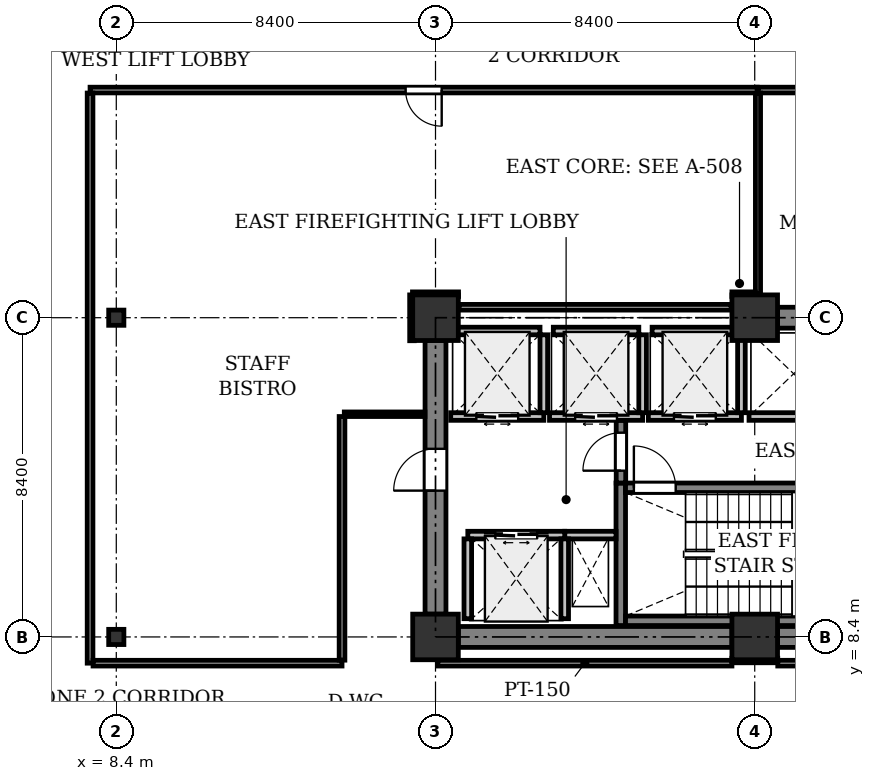
"""IFC4 building model, lengths in metres.
Left out: names, types, materials, properties, quantities, classifications, styles, units other than length and angle.
Written with IfcOpenShell. Run it as: python <this file> out.ifc"""

import sys

from ifc_helpers import new_model, si_unit, direction, frame, frame_2d, origin, origin_2d, place, context, subcontext, project, spatial, rectangle, i_section, extrude, element, fill, save


model = new_model("IFC4")
c1 = context("Model", 3, precision=1e-05, world=origin(), true_north=direction((0.0, 1.0)))
c2 = subcontext(c1, "Body", "Model", "MODEL_VIEW")
j1 = project(units=[si_unit("LENGTHUNIT", "METRE"), si_unit("PLANEANGLEUNIT", "RADIAN")], contexts=[c1])
p1 = place(None, origin())
s1 = spatial("IfcSite", under=j1, at=p1, CompositionType="ELEMENT")
p2 = place(p1, origin())
s2 = spatial("IfcBuilding", under=s1, at=p2, CompositionType="ELEMENT")
p3 = place(p2, frame((0.0, 0.0, 117.2)))
s3 = spatial("IfcBuildingStorey", under=s2, at=p3, CompositionType="ELEMENT", Elevation=117.2)
for number, where, z_axis, x_axis in (
    (1, (8.4, 8.4, 0.0), (0.0, 0.0, 1.0), (1.0, 0.0, 0.0)),
    (2, (8.4, 16.8, 0.0), (0.0, 0.0, 1.0), (1.0, 0.0, 0.0)),
):
    element("IfcColumn", number, at=place(p3, frame(where, z_axis=z_axis, x_axis=x_axis)), inside=s3, PredefinedType="COLUMN", context=c2, shape_type="SweptSolid", body=[
        extrude(i_section(OverallWidth=0.4, OverallDepth=0.4, WebThickness=0.025, FlangeThickness=0.04, at=origin_2d()), origin(), (0.0, 0.0, 1.0), 4.1),
    ])
for number, where, z_axis, x_axis in (
    (3, (16.8, 8.4, 0.0), (0.0, 0.0, 1.0), (1.0, 0.0, 0.0)),
    (4, (16.8, 16.8, 0.0), (0.0, 0.0, 1.0), (1.0, 0.0, 0.0)),
    (5, (25.2, 8.4, 0.0), (0.0, 0.0, 1.0), (1.0, 0.0, 0.0)),
    (6, (25.2, 16.8, 0.0), (0.0, 0.0, 1.0), (1.0, 0.0, 0.0)),
):
    element("IfcColumn", number, at=place(p3, frame(where, z_axis=z_axis, x_axis=x_axis)), inside=s3, PredefinedType="COLUMN", context=c2, shape_type="SweptSolid", body=[
        extrude(rectangle(XDim=1.2, YDim=1.2, at=origin_2d()), origin(), (0.0, 0.0, 1.0), 4.1),
    ])
p4 = place(p3, frame((17.4, 8.4, 0.0), z_axis=(0.0, 0.0, 1.0), x_axis=(1.0, 0.0, 0.0)))
e7 = element("IfcWall", 7, at=p4, inside=s3, PredefinedType="SHEAR", context=c2, shape_type="SweptSolid", body=[
    extrude(rectangle(XDim=7.2, YDim=0.55, at=frame_2d((3.6, 0.0))), origin(), (0.0, 0.0, 1.0), 3.825),
])
p5 = place(p3, frame((25.8, 8.4, 0.0), z_axis=(0.0, 0.0, 1.0), x_axis=(1.0, 0.0, 0.0)))
e8 = element("IfcWall", 8, at=p5, inside=s3, PredefinedType="SHEAR", context=c2, shape_type="SweptSolid", body=[
    extrude(rectangle(XDim=7.2, YDim=0.55, at=frame_2d((3.6, 0.0))), origin(), (0.0, 0.0, 1.0), 3.825),
])
p6 = place(p3, frame((16.8, 9.0, 0.0), z_axis=(0.0, 0.0, 1.0), x_axis=(0.0, 1.0, 0.0)))
e9 = element("IfcWall", 9, at=p6, inside=s3, PredefinedType="SHEAR", context=c2, shape_type="SweptSolid", body=[
    extrude(rectangle(XDim=7.2, YDim=0.55, at=frame_2d((3.6, 0.0))), origin(), (0.0, 0.0, 1.0), 3.825),
])
p7 = place(p6, frame((3.25, 0.0, 0.0)))
e10 = element("IfcOpeningElement", 10, at=p7, cuts=e9, PredefinedType="OPENING", context=c2, shape_type="SweptSolid", body=[
    extrude(rectangle(XDim=1.1, YDim=2.15, at=frame_2d((0.55, 1.075))), frame((0.0, 0.285, 0.0), z_axis=(0.0, -1.0, 0.0), x_axis=(1.0, 0.0, 0.0)), (0.0, 0.0, 1.0), 0.57),
])
p8 = place(p3, frame((25.8, 16.8, 0.0), z_axis=(0.0, 0.0, 1.0), x_axis=(1.0, 0.0, 0.0)))
e11 = element("IfcWall", 11, at=p8, inside=s3, PredefinedType="SHEAR", context=c2, shape_type="SweptSolid", body=[
    extrude(rectangle(XDim=7.2, YDim=0.55, at=frame_2d((3.6, 0.0))), origin(), (0.0, 0.0, 1.0), 3.825),
])
p9 = place(p3, frame((21.675, 8.7, 0.0), z_axis=(0.0, 0.0, 1.0), x_axis=(0.0, 1.0, 0.0)))
e12 = element("IfcWall", 12, at=p9, inside=s3, PredefinedType="SHEAR", context=c2, shape_type="SweptSolid", body=[
    extrude(rectangle(XDim=3.75, YDim=0.25, at=frame_2d((1.875, 0.0))), origin(), (0.0, 0.0, 1.0), 3.825),
])
p10 = place(p3, frame((21.8, 8.825, 0.0), z_axis=(0.0, 0.0, 1.0), x_axis=(1.0, 0.0, 0.0)))
e13 = element("IfcWall", 13, at=p10, inside=s3, PredefinedType="SHEAR", context=c2, shape_type="SweptSolid", body=[
    extrude(rectangle(XDim=7.75, YDim=0.25, at=frame_2d((3.875, 0.0))), origin(), (0.0, 0.0, 1.0), 3.825),
])
p11 = place(p3, frame((21.8, 12.325, 0.0), z_axis=(0.0, 0.0, 1.0), x_axis=(1.0, 0.0, 0.0)))
e14 = element("IfcWall", 14, at=p11, inside=s3, PredefinedType="SHEAR", context=c2, shape_type="SweptSolid", body=[
    extrude(rectangle(XDim=7.75, YDim=0.25, at=frame_2d((3.875, 0.0))), origin(), (0.0, 0.0, 1.0), 3.825),
])
p12 = place(p11, frame((0.22, 0.0, 0.0)))
e15 = element("IfcOpeningElement", 15, at=p12, cuts=e14, PredefinedType="OPENING", context=c2, shape_type="SweptSolid", body=[
    extrude(rectangle(XDim=1.1, YDim=2.15, at=frame_2d((0.55, 1.075))), frame((0.0, 0.135, 0.0), z_axis=(0.0, -1.0, 0.0), x_axis=(1.0, 0.0, 0.0)), (0.0, 0.0, 1.0), 0.27),
])
p13 = place(p3, frame((20.2, 11.08, 0.0), z_axis=(0.0, 0.0, 1.0), x_axis=(1.0, 0.0, 0.0)))
e16 = element("IfcWall", 16, at=p13, inside=s3, PredefinedType="PARTITIONING", context=c2, shape_type="SweptSolid", body=[
    extrude(rectangle(XDim=1.35, YDim=0.2, at=frame_2d((0.675, 0.0))), origin(), (0.0, 0.0, 1.0), 3.825),
])
p14 = place(p3, frame((21.68, 12.45, 0.0), z_axis=(0.0, 0.0, 1.0), x_axis=(0.0, 1.0, 0.0)))
e17 = element("IfcWall", 17, at=p14, inside=s3, PredefinedType="SHEAR", context=c2, shape_type="SweptSolid", body=[
    extrude(rectangle(XDim=1.65, YDim=0.25, at=frame_2d((0.825, 0.0))), origin(), (0.0, 0.0, 1.0), 3.825),
])
p15 = place(p14, frame((0.325, 0.0, 0.0)))
e18 = element("IfcOpeningElement", 18, at=p15, cuts=e17, PredefinedType="OPENING", context=c2, shape_type="SweptSolid", body=[
    extrude(rectangle(XDim=1.0, YDim=2.15, at=frame_2d((0.5, 1.075))), frame((0.0, 0.135, 0.0), z_axis=(0.0, -1.0, 0.0), x_axis=(1.0, 0.0, 0.0)), (0.0, 0.0, 1.0), 0.27),
])
p16 = place(p3, frame((17.65, 11.08, 0.0), z_axis=(0.0, 0.0, 1.0), x_axis=(1.0, 0.0, 0.0)))
e19 = element("IfcWall", 19, at=p16, inside=s3, PredefinedType="PARTITIONING", context=c2, shape_type="SweptSolid", body=[
    extrude(rectangle(XDim=2.55, YDim=0.2, at=frame_2d((1.275, 0.0))), origin(), (0.0, 0.0, 1.0), 3.825),
])
p17 = place(p16, frame((0.725, 0.0, 0.0)))
e20 = element("IfcOpeningElement", 20, at=p17, cuts=e19, PredefinedType="OPENING", context=c2, shape_type="SweptSolid", body=[
    extrude(rectangle(XDim=1.1, YDim=2.2, at=frame_2d((0.55, 1.1))), frame((0.0, 0.11, 0.0), z_axis=(0.0, -1.0, 0.0), x_axis=(1.0, 0.0, 0.0)), (0.0, 0.0, 1.0), 0.22),
])
for number, where, z_axis, x_axis in (
    (21, (20.2, 8.88, 0.0), (0.0, 0.0, 1.0), (0.0, 1.0, 0.0)),
    (22, (17.65, 8.88, 0.0), (0.0, 0.0, 1.0), (0.0, 1.0, 0.0)),
):
    element("IfcWall", number, at=place(p3, frame(where, z_axis=z_axis, x_axis=x_axis)), inside=s3, PredefinedType="PARTITIONING", context=c2, shape_type="SweptSolid", body=[
        extrude(rectangle(XDim=2.1, YDim=0.2, at=frame_2d((1.05, 0.0))), origin(), (0.0, 0.0, 1.0), 3.825),
    ])
p18 = place(p3, frame((17.2, 14.2, 0.0), z_axis=(0.0, 0.0, 1.0), x_axis=(1.0, 0.0, 0.0)))
e23 = element("IfcWall", 23, at=p18, inside=s3, PredefinedType="PARTITIONING", context=c2, shape_type="SweptSolid", body=[
    extrude(rectangle(XDim=2.45, YDim=0.2, at=frame_2d((1.225, 0.0))), origin(), (0.0, 0.0, 1.0), 3.825),
])
p19 = place(p18, frame((0.675, 0.0, 0.0)))
e24 = element("IfcOpeningElement", 24, at=p19, cuts=e23, PredefinedType="OPENING", context=c2, shape_type="SweptSolid", body=[
    extrude(rectangle(XDim=1.1, YDim=2.2, at=frame_2d((0.55, 1.1))), frame((0.0, 0.11, 0.0), z_axis=(0.0, -1.0, 0.0), x_axis=(1.0, 0.0, 0.0)), (0.0, 0.0, 1.0), 0.22),
])
p20 = place(p3, frame((19.65, 14.3, 0.0), z_axis=(0.0, 0.0, 1.0), x_axis=(0.0, 1.0, 0.0)))
e25 = element("IfcWall", 25, at=p20, inside=s3, PredefinedType="PARTITIONING", context=c2, shape_type="SweptSolid", body=[
    extrude(rectangle(XDim=2.05, YDim=0.2, at=frame_2d((1.025, 0.0))), origin(), (0.0, 0.0, 1.0), 3.825),
])
p21 = place(p3, frame((17.3, 16.45, 0.0), z_axis=(0.0, 0.0, 1.0), x_axis=(1.0, 0.0, 0.0)))
e26 = element("IfcWall", 26, at=p21, inside=s3, PredefinedType="PARTITIONING", context=c2, shape_type="SweptSolid", body=[
    extrude(rectangle(XDim=2.25, YDim=0.2, at=frame_2d((1.125, 0.0))), origin(), (0.0, 0.0, 1.0), 3.825),
])
p22 = place(p3, frame((19.8, 14.2, 0.0), z_axis=(0.0, 0.0, 1.0), x_axis=(1.0, 0.0, 0.0)))
e27 = element("IfcWall", 27, at=p22, inside=s3, PredefinedType="PARTITIONING", context=c2, shape_type="SweptSolid", body=[
    extrude(rectangle(XDim=2.45, YDim=0.2, at=frame_2d((1.225, 0.0))), origin(), (0.0, 0.0, 1.0), 3.825),
])
p23 = place(p22, frame((0.675, 0.0, 0.0)))
e28 = element("IfcOpeningElement", 28, at=p23, cuts=e27, PredefinedType="OPENING", context=c2, shape_type="SweptSolid", body=[
    extrude(rectangle(XDim=1.1, YDim=2.2, at=frame_2d((0.55, 1.1))), frame((0.0, 0.11, 0.0), z_axis=(0.0, -1.0, 0.0), x_axis=(1.0, 0.0, 0.0)), (0.0, 0.0, 1.0), 0.22),
])
p24 = place(p3, frame((22.25, 14.3, 0.0), z_axis=(0.0, 0.0, 1.0), x_axis=(0.0, 1.0, 0.0)))
e29 = element("IfcWall", 29, at=p24, inside=s3, PredefinedType="PARTITIONING", context=c2, shape_type="SweptSolid", body=[
    extrude(rectangle(XDim=2.05, YDim=0.2, at=frame_2d((1.025, 0.0))), origin(), (0.0, 0.0, 1.0), 3.825),
])
p25 = place(p3, frame((19.9, 16.45, 0.0), z_axis=(0.0, 0.0, 1.0), x_axis=(1.0, 0.0, 0.0)))
e30 = element("IfcWall", 30, at=p25, inside=s3, PredefinedType="PARTITIONING", context=c2, shape_type="SweptSolid", body=[
    extrude(rectangle(XDim=2.25, YDim=0.2, at=frame_2d((1.125, 0.0))), origin(), (0.0, 0.0, 1.0), 3.825),
])
p26 = place(p3, frame((22.4, 14.2, 0.0), z_axis=(0.0, 0.0, 1.0), x_axis=(1.0, 0.0, 0.0)))
e31 = element("IfcWall", 31, at=p26, inside=s3, PredefinedType="PARTITIONING", context=c2, shape_type="SweptSolid", body=[
    extrude(rectangle(XDim=2.45, YDim=0.2, at=frame_2d((1.225, 0.0))), origin(), (0.0, 0.0, 1.0), 3.825),
])
p27 = place(p26, frame((0.675, 0.0, 0.0)))
e32 = element("IfcOpeningElement", 32, at=p27, cuts=e31, PredefinedType="OPENING", context=c2, shape_type="SweptSolid", body=[
    extrude(rectangle(XDim=1.1, YDim=2.2, at=frame_2d((0.55, 1.1))), frame((0.0, 0.11, 0.0), z_axis=(0.0, -1.0, 0.0), x_axis=(1.0, 0.0, 0.0)), (0.0, 0.0, 1.0), 0.22),
])
p28 = place(p3, frame((24.85, 14.3, 0.0), z_axis=(0.0, 0.0, 1.0), x_axis=(0.0, 1.0, 0.0)))
e33 = element("IfcWall", 33, at=p28, inside=s3, PredefinedType="PARTITIONING", context=c2, shape_type="SweptSolid", body=[
    extrude(rectangle(XDim=2.05, YDim=0.2, at=frame_2d((1.025, 0.0))), origin(), (0.0, 0.0, 1.0), 3.825),
])
p29 = place(p3, frame((22.5, 16.45, 0.0), z_axis=(0.0, 0.0, 1.0), x_axis=(1.0, 0.0, 0.0)))
e34 = element("IfcWall", 34, at=p29, inside=s3, PredefinedType="PARTITIONING", context=c2, shape_type="SweptSolid", body=[
    extrude(rectangle(XDim=2.25, YDim=0.2, at=frame_2d((1.125, 0.0))), origin(), (0.0, 0.0, 1.0), 3.825),
])
p30 = place(p3, frame((25.05, 14.2, 0.0), z_axis=(0.0, 0.0, 1.0), x_axis=(1.0, 0.0, 0.0)))
e35 = element("IfcWall", 35, at=p30, inside=s3, PredefinedType="PARTITIONING", context=c2, shape_type="SweptSolid", body=[
    extrude(rectangle(XDim=2.35, YDim=0.2, at=frame_2d((1.175, 0.0))), origin(), (0.0, 0.0, 1.0), 3.825),
])
p31 = place(p3, frame((25.806, 7.781, 0.0), z_axis=(0.0, 0.0, 1.0), x_axis=(-0.999999672047, -0.000809880277, 0.0)))
e36 = element("IfcWall", 36, at=p31, inside=s3, PredefinedType="PARTITIONING", context=c2, shape_type="SweptSolid", body=[
    extrude(rectangle(XDim=1.206, YDim=0.12, at=frame_2d((0.603, 0.0))), origin(), (0.0, 0.0, 1.0), 3.297),
])
p32 = place(p3, frame((16.86, 7.71, 0.0), z_axis=(0.0, 0.0, 1.0), x_axis=(1.0, 0.0, 0.0)))
e37 = element("IfcWall", 37, at=p32, inside=s3, PredefinedType="PARTITIONING", context=c2, shape_type="SweptSolid", body=[
    extrude(rectangle(XDim=7.74, YDim=0.15, at=frame_2d((3.87, 0.0))), origin(), (0.0, 0.0, 1.0), 3.297),
])
p33 = place(p3, frame((25.806, 7.71, 0.0), z_axis=(0.0, 0.0, 1.0), x_axis=(1.0, 0.0, 0.0)))
e38 = element("IfcWall", 38, at=p33, inside=s3, PredefinedType="PARTITIONING", context=c2, shape_type="SweptSolid", body=[
    extrude(rectangle(XDim=8.534, YDim=0.15, at=frame_2d((4.267, 0.0))), origin(), (0.0, 0.0, 1.0), 3.297),
])
p34 = place(p3, frame((34.261, 22.79, 0.0), z_axis=(0.0, 0.0, 1.0), x_axis=(-1.0, 0.0, 0.0)))
e39 = element("IfcWall", 39, at=p34, inside=s3, PredefinedType="PARTITIONING", context=c2, shape_type="SweptSolid", body=[
    extrude(rectangle(XDim=8.975, YDim=0.15, at=frame_2d((4.488, 0.0))), origin(), (0.0, 0.0, 1.0), 3.297),
])
p35 = place(p34, frame((4.013, 0.0, 0.0)))
e40 = element("IfcOpeningElement", 40, at=p35, cuts=e39, PredefinedType="OPENING", context=c2, shape_type="SweptSolid", body=[
    extrude(rectangle(XDim=0.95, YDim=2.15, at=frame_2d((0.475, 1.075))), frame((0.0, 0.085, 0.0), z_axis=(0.0, -1.0, 0.0), x_axis=(1.0, 0.0, 0.0)), (0.0, 0.0, 1.0), 0.17),
])
p36 = place(p3, frame((25.286, 22.711, 0.0), z_axis=(0.0, 0.0, 1.0), x_axis=(0.0, -1.0, 0.0)))
e41 = element("IfcWall", 41, at=p36, inside=s3, PredefinedType="PARTITIONING", context=c2, shape_type="SweptSolid", body=[
    extrude(rectangle(XDim=5.291, YDim=0.135, at=frame_2d((2.646, 0.0))), origin(), (0.0, 0.0, 1.0), 3.297),
])
p37 = place(p3, frame((14.4, 14.26, 0.0), z_axis=(0.0, 0.0, 1.0), x_axis=(1.0, 0.0, 0.0)))
e42 = element("IfcWall", 42, at=p37, inside=s3, PredefinedType="PARTITIONING", context=c2, shape_type="SweptSolid", body=[
    extrude(rectangle(XDim=2.121, YDim=0.12, at=frame_2d((1.061, 0.0))), origin(), (0.0, 0.0, 1.0), 3.825),
])
p38 = place(p3, frame((16.181, 16.194, 0.0), z_axis=(0.0, 0.0, 1.0), x_axis=(-0.000809880277, 0.999999672047, 0.0)))
e43 = element("IfcWall", 43, at=p38, inside=s3, PredefinedType="PARTITIONING", context=c2, shape_type="SweptSolid", body=[
    extrude(rectangle(XDim=1.206, YDim=0.12, at=frame_2d((0.603, 0.0))), origin(), (0.0, 0.0, 1.0), 3.292),
])
p39 = place(p3, frame((16.194, 17.419, 0.0), z_axis=(0.0, 0.0, 1.0), x_axis=(1.0, 0.0, 0.0)))
e44 = element("IfcWall", 44, at=p39, inside=s3, PredefinedType="PARTITIONING", context=c2, shape_type="SweptSolid", body=[
    extrude(rectangle(XDim=1.212, YDim=0.12, at=frame_2d((0.606, 0.0))), origin(), (0.0, 0.0, 1.0), 3.297),
])
p40 = place(p3, frame((17.42, 17.075, 0.0), z_axis=(0.0, 0.0, 1.0), x_axis=(1.0, 0.0, 0.0)))
e45 = element("IfcWall", 45, at=p40, inside=s3, PredefinedType="PARTITIONING", context=c2, shape_type="SweptSolid", body=[
    extrude(rectangle(XDim=7.16, YDim=0.15, at=frame_2d((3.58, 0.0))), origin(), (0.0, 0.0, 1.0), 3.469),
])
p41 = place(p3, frame((24.6, 17.42, 0.0), z_axis=(0.0, 0.0, 1.0), x_axis=(1.0, 0.0, 0.0)))
e46 = element("IfcWall", 46, at=p41, inside=s3, PredefinedType="PARTITIONING", context=c2, shape_type="SweptSolid", body=[
    extrude(rectangle(XDim=0.614, YDim=0.12, at=frame_2d((0.307, 0.0))), origin(), (0.0, 0.0, 1.0), 3.297),
])
p42 = place(p3, frame((25.266, 22.79, 0.0), z_axis=(0.0, 0.0, 1.0), x_axis=(-1.0, 0.0, 0.0)))
e47 = element("IfcWall", 47, at=p42, inside=s3, PredefinedType="PARTITIONING", context=c2, shape_type="SweptSolid", body=[
    extrude(rectangle(XDim=17.556, YDim=0.15, at=frame_2d((8.778, 0.0))), origin(), (0.0, 0.0, 1.0), 3.297),
])
p43 = place(p42, frame((8.303, 0.0, 0.0)))
e48 = element("IfcOpeningElement", 48, at=p43, cuts=e47, PredefinedType="OPENING", context=c2, shape_type="SweptSolid", body=[
    extrude(rectangle(XDim=0.95, YDim=2.15, at=frame_2d((0.475, 1.075))), frame((0.0, 0.085, 0.0), z_axis=(0.0, -1.0, 0.0), x_axis=(1.0, 0.0, 0.0)), (0.0, 0.0, 1.0), 0.17),
])
p44 = place(p3, frame((7.71, 22.711, 0.0), z_axis=(0.0, 0.0, 1.0), x_axis=(0.0, -1.0, 0.0)))
e49 = element("IfcWall", 49, at=p44, inside=s3, PredefinedType="PARTITIONING", context=c2, shape_type="SweptSolid", body=[
    extrude(rectangle(XDim=15.001, YDim=0.15, at=frame_2d((7.5, 0.0))), origin(), (0.0, 0.0, 1.0), 3.292),
])
p45 = place(p3, frame((7.789, 7.71, 0.0), z_axis=(0.0, 0.0, 1.0), x_axis=(1.0, 0.0, 0.0)))
e50 = element("IfcWall", 50, at=p45, inside=s3, PredefinedType="PARTITIONING", context=c2, shape_type="SweptSolid", body=[
    extrude(rectangle(XDim=6.551, YDim=0.15, at=frame_2d((3.275, 0.0))), origin(), (0.0, 0.0, 1.0), 3.297),
])
p46 = place(p3, frame((14.34, 7.789, 0.0), z_axis=(0.0, 0.0, 1.0), x_axis=(0.0, 1.0, 0.0)))
e51 = element("IfcWall", 51, at=p46, inside=s3, PredefinedType="PARTITIONING", context=c2, shape_type="SweptSolid", body=[
    extrude(rectangle(XDim=6.411, YDim=0.15, at=frame_2d((3.206, 0.0))), origin(), (0.0, 0.0, 1.0), 3.292),
])
p47 = place(p7, origin())
e52 = element("IfcDoor", 52, at=p47, inside=s3, OperationType="SINGLE_SWING_LEFT", PredefinedType="DOOR", context=c2, shape_type="SweptSolid", body=[
    extrude(rectangle(XDim=1.1, YDim=2.15, at=frame_2d((0.55, 1.075))), frame((0.0, 0.025, 0.0), z_axis=(0.0, -1.0, 0.0), x_axis=(1.0, 0.0, 0.0)), (0.0, 0.0, 1.0), 0.05),
])
fill(e10, e52)
p48 = place(p12, origin())
e53 = element("IfcDoor", 53, at=p48, inside=s3, OperationType="SINGLE_SWING_LEFT", PredefinedType="DOOR", context=c2, shape_type="SweptSolid", body=[
    extrude(rectangle(XDim=1.1, YDim=2.15, at=frame_2d((0.55, 1.075))), frame((0.0, 0.025, 0.0), z_axis=(0.0, -1.0, 0.0), x_axis=(1.0, 0.0, 0.0)), (0.0, 0.0, 1.0), 0.05),
])
fill(e15, e53)
p49 = place(p15, origin())
e54 = element("IfcDoor", 54, at=p49, inside=s3, OperationType="SINGLE_SWING_LEFT", PredefinedType="DOOR", context=c2, shape_type="SweptSolid", body=[
    extrude(rectangle(XDim=1.0, YDim=2.15, at=frame_2d((0.5, 1.075))), frame((0.0, 0.025, 0.0), z_axis=(0.0, -1.0, 0.0), x_axis=(1.0, 0.0, 0.0)), (0.0, 0.0, 1.0), 0.05),
])
fill(e18, e54)
p50 = place(p17, origin())
e55 = element("IfcDoor", 55, at=p50, inside=s3, OperationType="DOUBLE_DOOR_SLIDING", PredefinedType="DOOR", context=c2, shape_type="SweptSolid", body=[
    extrude(rectangle(XDim=1.1, YDim=2.2, at=frame_2d((0.55, 1.1))), frame((0.0, 0.025, 0.0), z_axis=(0.0, -1.0, 0.0), x_axis=(1.0, 0.0, 0.0)), (0.0, 0.0, 1.0), 0.05),
])
fill(e20, e55)
p51 = place(p19, origin())
e56 = element("IfcDoor", 56, at=p51, inside=s3, OperationType="DOUBLE_DOOR_SLIDING", PredefinedType="DOOR", context=c2, shape_type="SweptSolid", body=[
    extrude(rectangle(XDim=1.1, YDim=2.2, at=frame_2d((0.55, 1.1))), frame((0.0, 0.025, 0.0), z_axis=(0.0, -1.0, 0.0), x_axis=(1.0, 0.0, 0.0)), (0.0, 0.0, 1.0), 0.05),
])
fill(e24, e56)
p52 = place(p23, origin())
e57 = element("IfcDoor", 57, at=p52, inside=s3, OperationType="DOUBLE_DOOR_SLIDING", PredefinedType="DOOR", context=c2, shape_type="SweptSolid", body=[
    extrude(rectangle(XDim=1.1, YDim=2.2, at=frame_2d((0.55, 1.1))), frame((0.0, 0.025, 0.0), z_axis=(0.0, -1.0, 0.0), x_axis=(1.0, 0.0, 0.0)), (0.0, 0.0, 1.0), 0.05),
])
fill(e28, e57)
p53 = place(p27, origin())
e58 = element("IfcDoor", 58, at=p53, inside=s3, OperationType="DOUBLE_DOOR_SLIDING", PredefinedType="DOOR", context=c2, shape_type="SweptSolid", body=[
    extrude(rectangle(XDim=1.1, YDim=2.2, at=frame_2d((0.55, 1.1))), frame((0.0, 0.025, 0.0), z_axis=(0.0, -1.0, 0.0), x_axis=(1.0, 0.0, 0.0)), (0.0, 0.0, 1.0), 0.05),
])
fill(e32, e58)
p54 = place(p43, origin())
e59 = element("IfcDoor", 59, at=p54, inside=s3, OperationType="SINGLE_SWING_LEFT", PredefinedType="DOOR", context=c2, shape_type="SweptSolid", body=[
    extrude(rectangle(XDim=0.95, YDim=2.15, at=frame_2d((0.475, 1.075))), frame((0.0, 0.025, 0.0), z_axis=(0.0, -1.0, 0.0), x_axis=(1.0, 0.0, 0.0)), (0.0, 0.0, 1.0), 0.05),
])
fill(e48, e59)
save(model, sys.argv[1])
